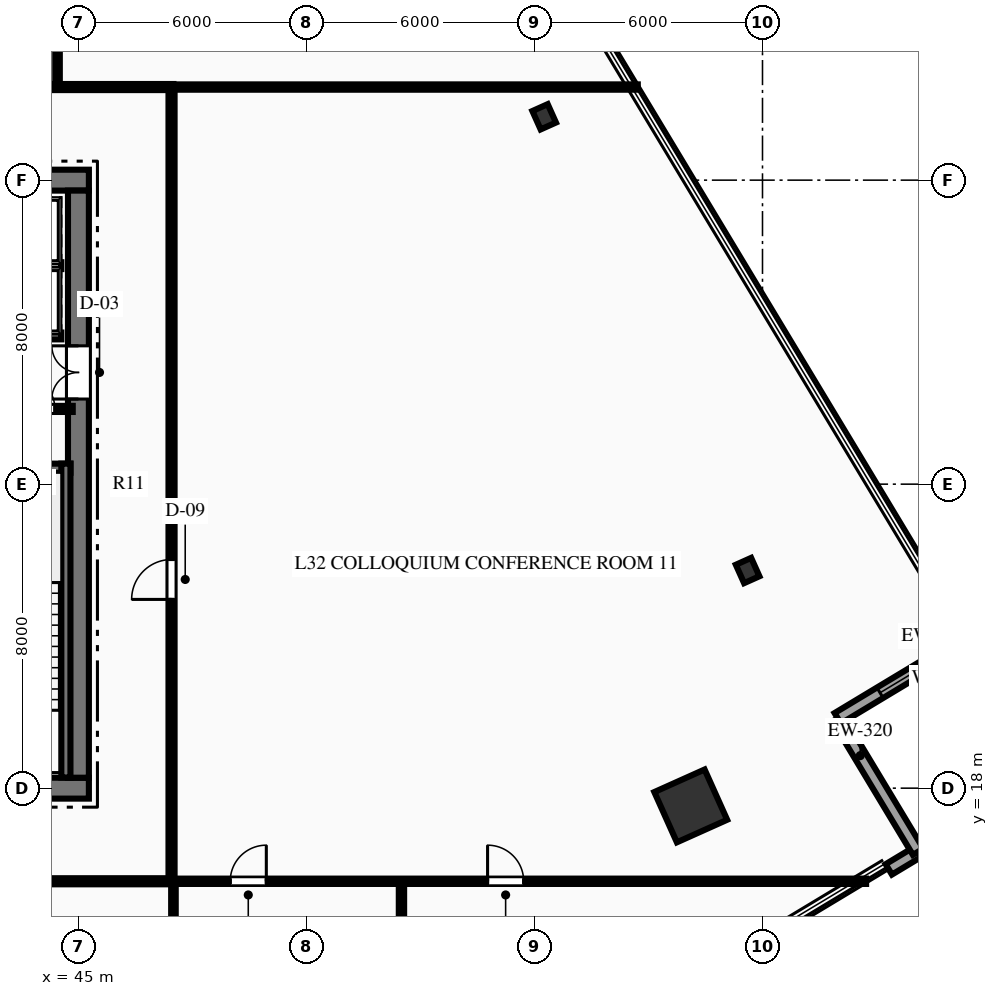
"""IFC4 building model, lengths in metres.
Left out: names, types, materials, properties, quantities, classifications, styles, units other than length and angle.
Written with IfcOpenShell. Run it as: python <this file> out.ifc"""

import sys

from ifc_helpers import new_model, si_unit, direction, frame, frame_2d, origin, origin_2d, place, context, subcontext, project, spatial, rectangle, hollow_rectangle, i_section, extrude, element, fill, save


model = new_model("IFC4")
c1 = context("Model", 3, precision=1e-05, world=origin(), true_north=direction((0.0, 1.0)))
c2 = subcontext(c1, "Body", "Model", "MODEL_VIEW")
j1 = project(units=[si_unit("LENGTHUNIT", "METRE"), si_unit("PLANEANGLEUNIT", "RADIAN")], contexts=[c1])
p1 = place(None, origin())
s1 = spatial("IfcSite", under=j1, at=p1, CompositionType="ELEMENT")
p2 = place(p1, origin())
s2 = spatial("IfcBuilding", under=s1, at=p2, CompositionType="ELEMENT")
p3 = place(p2, frame((0.0, 0.0, 131.7)))
s3 = spatial("IfcBuildingStorey", under=s2, at=p3, CompositionType="ELEMENT", Elevation=131.7)
p4 = place(p3, frame((26.725, 18.0, 0.0), z_axis=(0.0, 0.0, 1.0), x_axis=(1.0, 0.0, 0.0)))
e1 = element("IfcWall", 1, at=p4, inside=s3, PredefinedType="SHEAR", context=c2, shape_type="SweptSolid", body=[
    extrude(rectangle(XDim=18.55, YDim=0.55, at=frame_2d((9.275, 0.0))), origin(), (0.0, 0.0, 1.0), 4.5),
])
p5 = place(p4, frame((7.375, 0.0, 0.0)))
e2 = element("IfcOpeningElement", 2, at=p5, cuts=e1, PredefinedType="OPENING", context=c2, shape_type="SweptSolid", body=[
    extrude(rectangle(XDim=1.1, YDim=2.15, at=frame_2d((0.55, 1.075))), frame((0.0, 0.285, 0.0), z_axis=(0.0, -1.0, 0.0), x_axis=(1.0, 0.0, 0.0)), (0.0, 0.0, 1.0), 0.57),
])
p6 = place(p4, frame((10.075, 0.0, 0.0)))
e3 = element("IfcOpeningElement", 3, at=p6, cuts=e1, PredefinedType="OPENING", context=c2, shape_type="SweptSolid", body=[
    extrude(rectangle(XDim=1.1, YDim=2.15, at=frame_2d((0.55, 1.075))), frame((0.0, 0.285, 0.0), z_axis=(0.0, -1.0, 0.0), x_axis=(1.0, 0.0, 0.0)), (0.0, 0.0, 1.0), 0.57),
])
p7 = place(p3, frame((26.725, 34.0, 0.0), z_axis=(0.0, 0.0, 1.0), x_axis=(1.0, 0.0, 0.0)))
e4 = element("IfcWall", 4, at=p7, inside=s3, PredefinedType="SHEAR", context=c2, shape_type="SweptSolid", body=[
    extrude(rectangle(XDim=18.55, YDim=0.55, at=frame_2d((9.275, 0.0))), origin(), (0.0, 0.0, 1.0), 4.5),
])
p8 = place(p7, frame((1.24, 0.0, 0.0)))
e5 = element("IfcOpeningElement", 5, at=p8, cuts=e4, PredefinedType="OPENING", context=c2, shape_type="SweptSolid", body=[
    extrude(rectangle(XDim=1.1, YDim=2.15, at=frame_2d((0.55, 1.075))), frame((0.0, 0.285, 0.0), z_axis=(0.0, -1.0, 0.0), x_axis=(1.0, 0.0, 0.0)), (0.0, 0.0, 1.0), 0.57),
])
p9 = place(p7, frame((3.49, 0.0, 0.0)))
e6 = element("IfcOpeningElement", 6, at=p9, cuts=e4, PredefinedType="OPENING", context=c2, shape_type="SweptSolid", body=[
    extrude(rectangle(XDim=1.1, YDim=2.15, at=frame_2d((0.55, 1.075))), frame((0.0, 0.285, 0.0), z_axis=(0.0, -1.0, 0.0), x_axis=(1.0, 0.0, 0.0)), (0.0, 0.0, 1.0), 0.57),
])
p10 = place(p7, frame((13.96, 0.0, 0.0)))
e7 = element("IfcOpeningElement", 7, at=p10, cuts=e4, PredefinedType="OPENING", context=c2, shape_type="SweptSolid", body=[
    extrude(rectangle(XDim=1.1, YDim=2.15, at=frame_2d((0.55, 1.075))), frame((0.0, 0.285, 0.0), z_axis=(0.0, -1.0, 0.0), x_axis=(1.0, 0.0, 0.0)), (0.0, 0.0, 1.0), 0.57),
])
p11 = place(p7, frame((16.21, 0.0, 0.0)))
e8 = element("IfcOpeningElement", 8, at=p11, cuts=e4, PredefinedType="OPENING", context=c2, shape_type="SweptSolid", body=[
    extrude(rectangle(XDim=1.1, YDim=2.15, at=frame_2d((0.55, 1.075))), frame((0.0, 0.285, 0.0), z_axis=(0.0, -1.0, 0.0), x_axis=(1.0, 0.0, 0.0)), (0.0, 0.0, 1.0), 0.57),
])
p12 = place(p3, frame((45.0, 18.275, 0.0), z_axis=(0.0, 0.0, 1.0), x_axis=(0.0, 1.0, 0.0)))
e9 = element("IfcWall", 9, at=p12, inside=s3, PredefinedType="SHEAR", context=c2, shape_type="SweptSolid", body=[
    extrude(rectangle(XDim=15.45, YDim=0.55, at=frame_2d((7.725, 0.0))), origin(), (0.0, 0.0, 1.0), 4.5),
])
p13 = place(p12, frame((9.965, 0.0, 0.0)))
e10 = element("IfcOpeningElement", 10, at=p13, cuts=e9, PredefinedType="OPENING", context=c2, shape_type="SweptSolid", body=[
    extrude(rectangle(XDim=1.4, YDim=2.2, at=frame_2d((0.7, 1.1))), frame((0.0, 0.285, 0.0), z_axis=(0.0, -1.0, 0.0), x_axis=(1.0, 0.0, 0.0)), (0.0, 0.0, 1.0), 0.57),
])
p14 = place(p3, frame((40.81, 26.42, 0.0), z_axis=(0.0, 0.0, 1.0), x_axis=(1.0, 0.0, 0.0)))
e11 = element("IfcWall", 11, at=p14, inside=s3, PredefinedType="SHEAR", context=c2, shape_type="SweptSolid", body=[
    extrude(rectangle(XDim=3.98, YDim=0.24, at=frame_2d((1.99, 0.0))), origin(), (0.0, 0.0, 1.0), 4.5),
])
p15 = place(p3, frame((44.67, 18.28, 0.0), z_axis=(0.0, 0.0, 1.0), x_axis=(0.0, 1.0, 0.0)))
e12 = element("IfcWall", 12, at=p15, inside=s3, PredefinedType="SHEAR", context=c2, shape_type="SweptSolid", body=[
    extrude(rectangle(XDim=8.26, YDim=0.24, at=frame_2d((4.13, 0.0))), origin(), (0.0, 0.0, 1.0), 4.5),
])
p16 = place(p3, frame((61.112, 17.533, 0.0), z_axis=(0.0, 0.0, 1.0), x_axis=(0.912477494148, 0.409126902895, 0.0)))
e13 = element("IfcColumn", 13, at=p16, inside=s3, PredefinedType="COLUMN", context=c2, shape_type="SweptSolid", body=[
    extrude(hollow_rectangle(XDim=1.45, YDim=1.45, WallThickness=0.07, at=origin_2d()), origin(), (0.0, 0.0, 1.0), 4.5),
])
for number, where, z_axis, x_axis in (
    (14, (62.609, 23.727, 0.0), (0.0, 0.0, 1.0), (0.912, 0.409, 0.0)),
    (15, (57.255, 35.667, 0.0), (0.0, 0.0, 1.0), (0.912, 0.409, 0.0)),
):
    element("IfcColumn", number, at=place(p3, frame(where, z_axis=z_axis, x_axis=x_axis)), inside=s3, PredefinedType="COLUMN", context=c2, shape_type="SweptSolid", body=[
        extrude(i_section(OverallWidth=0.442, OverallDepth=0.531, WebThickness=0.066, FlangeThickness=0.106, at=origin_2d()), origin(), (0.0, 0.0, 1.0), 4.5),
    ])
p17 = place(p3, frame((67.094, 16.327, 0.0), z_axis=(0.0, 0.0, 1.0), x_axis=(-0.856630082839, -0.51593110119, 0.0)))
e16 = element("IfcWall", 16, at=p17, inside=s3, PredefinedType="STANDARD", context=c2, shape_type="SweptSolid", body=[
    extrude(rectangle(XDim=0.9, YDim=0.32, at=frame_2d((0.45, 0.0))), origin(), (0.0, 0.0, 1.0), 4.1),
])
p18 = place(p3, frame((64.98, 19.84, 0.0), z_axis=(0.0, 0.0, 1.0), x_axis=(0.515799949359, -0.856709059274, 0.0)))
e17 = element("IfcWall", 17, at=p18, inside=s3, PredefinedType="STANDARD", context=c2, shape_type="SweptSolid", body=[
    extrude(rectangle(XDim=4.1, YDim=0.32, at=frame_2d((2.05, 0.0))), origin(), (0.0, 0.0, 1.0), 4.1),
])
p19 = place(p3, frame((68.492, 21.954, 0.0), z_axis=(0.0, 0.0, 1.0), x_axis=(-0.856709059274, -0.515799949359, 0.0)))
e18 = element("IfcWall", 18, at=p19, inside=s3, PredefinedType="STANDARD", context=c2, shape_type="SweptSolid", body=[
    extrude(rectangle(XDim=4.1, YDim=0.32, at=frame_2d((2.05, 0.0))), origin(), (0.0, 0.0, 1.0), 4.1),
])
p20 = place(p19, frame((1.3, 0.0, 0.85)))
e19 = element("IfcOpeningElement", 19, at=p20, cuts=e18, PredefinedType="OPENING", context=c2, shape_type="SweptSolid", body=[
    extrude(rectangle(XDim=1.5, YDim=2.1, at=frame_2d((0.75, 1.05))), frame((0.0, 0.17, 0.0), z_axis=(0.0, -1.0, 0.0), x_axis=(1.0, 0.0, 0.0)), (0.0, 0.0, 1.0), 0.34),
])
p21 = place(p3, frame((40.8, 27.98, 0.0), z_axis=(0.0, 0.0, 1.0), x_axis=(1.0, 0.0, 0.0)))
e20 = element("IfcWall", 20, at=p21, inside=s3, PredefinedType="PARTITIONING", context=c2, shape_type="SweptSolid", body=[
    extrude(rectangle(XDim=4.05, YDim=0.16, at=frame_2d((2.025, 0.0))), origin(), (0.0, 0.0, 1.0), 4.1),
])
p22 = place(p21, frame((0.77, 0.0, 0.0)))
e21 = element("IfcOpeningElement", 21, at=p22, cuts=e20, PredefinedType="OPENING", context=c2, shape_type="SweptSolid", body=[
    extrude(rectangle(XDim=0.9, YDim=2.15, at=frame_2d((0.45, 1.075))), frame((0.0, 0.09, 0.0), z_axis=(0.0, -1.0, 0.0), x_axis=(1.0, 0.0, 0.0)), (0.0, 0.0, 1.0), 0.18),
])
p23 = place(p21, frame((2.68, 0.0, 0.0)))
e22 = element("IfcOpeningElement", 22, at=p23, cuts=e20, PredefinedType="OPENING", context=c2, shape_type="SweptSolid", body=[
    extrude(rectangle(XDim=0.9, YDim=2.15, at=frame_2d((0.45, 1.075))), frame((0.0, 0.09, 0.0), z_axis=(0.0, -1.0, 0.0), x_axis=(1.0, 0.0, 0.0)), (0.0, 0.0, 1.0), 0.18),
])
p24 = place(p3, frame((40.12, 29.9, 0.0), z_axis=(0.0, 0.0, 1.0), x_axis=(1.0, 0.0, 0.0)))
e23 = element("IfcWall", 23, at=p24, inside=s3, PredefinedType="PARTITIONING", context=c2, shape_type="SweptSolid", body=[
    extrude(rectangle(XDim=4.43, YDim=0.18, at=frame_2d((2.215, 0.0))), origin(), (0.0, 0.0, 1.0), 4.1),
])
p25 = place(p24, frame((0.565, 0.0, 0.0)))
e24 = element("IfcOpeningElement", 24, at=p25, cuts=e23, PredefinedType="OPENING", context=c2, shape_type="SweptSolid", body=[
    extrude(rectangle(XDim=1.1, YDim=2.15, at=frame_2d((0.55, 1.075))), frame((0.0, 0.1, 0.0), z_axis=(0.0, -1.0, 0.0), x_axis=(1.0, 0.0, 0.0)), (0.0, 0.0, 1.0), 0.2),
])
p26 = place(p24, frame((2.815, 0.0, 0.0)))
e25 = element("IfcOpeningElement", 25, at=p26, cuts=e23, PredefinedType="OPENING", context=c2, shape_type="SweptSolid", body=[
    extrude(rectangle(XDim=1.1, YDim=2.15, at=frame_2d((0.55, 1.075))), frame((0.0, 0.1, 0.0), z_axis=(0.0, -1.0, 0.0), x_axis=(1.0, 0.0, 0.0)), (0.0, 0.0, 1.0), 0.2),
])
p27 = place(p3, frame((40.12, 31.75, 0.0), z_axis=(0.0, 0.0, 1.0), x_axis=(1.0, 0.0, 0.0)))
e26 = element("IfcWall", 26, at=p27, inside=s3, PredefinedType="PARTITIONING", context=c2, shape_type="SweptSolid", body=[
    extrude(rectangle(XDim=4.43, YDim=0.18, at=frame_2d((2.215, 0.0))), origin(), (0.0, 0.0, 1.0), 4.1),
])
p28 = place(p3, frame((24.5, 15.55, 0.0), z_axis=(0.0, 0.0, 1.0), x_axis=(1.0, 0.0, 0.0)))
e27 = element("IfcWall", 27, at=p28, inside=s3, PredefinedType="PARTITIONING", context=c2, shape_type="SweptSolid", body=[
    extrude(rectangle(XDim=23.0, YDim=0.16, at=frame_2d((11.5, 0.0))), origin(), (0.0, 0.0, 1.0), 4.1),
])
p29 = place(p28, frame((7.725, 0.0, 0.0)))
e28 = element("IfcOpeningElement", 28, at=p29, cuts=e27, PredefinedType="OPENING", context=c2, shape_type="SweptSolid", body=[
    extrude(rectangle(XDim=1.05, YDim=2.15, at=frame_2d((0.525, 1.075))), frame((0.0, 0.09, 0.0), z_axis=(0.0, -1.0, 0.0), x_axis=(1.0, 0.0, 0.0)), (0.0, 0.0, 1.0), 0.18),
])
p30 = place(p28, frame((17.489, 0.0, 0.0)))
e29 = element("IfcOpeningElement", 29, at=p30, cuts=e27, PredefinedType="OPENING", context=c2, shape_type="SweptSolid", body=[
    extrude(rectangle(XDim=1.05, YDim=2.15, at=frame_2d((0.525, 1.075))), frame((0.0, 0.09, 0.0), z_axis=(0.0, -1.0, 0.0), x_axis=(1.0, 0.0, 0.0)), (0.0, 0.0, 1.0), 0.18),
])
p31 = place(p3, frame((24.5, 36.45, 0.0), z_axis=(0.0, 0.0, 1.0), x_axis=(1.0, 0.0, 0.0)))
e30 = element("IfcWall", 30, at=p31, inside=s3, PredefinedType="PARTITIONING", context=c2, shape_type="SweptSolid", body=[
    extrude(rectangle(XDim=23.0, YDim=0.16, at=frame_2d((11.5, 0.0))), origin(), (0.0, 0.0, 1.0), 4.1),
])
p32 = place(p31, frame((13.75, 0.0, 0.0)))
e31 = element("IfcOpeningElement", 31, at=p32, cuts=e30, PredefinedType="OPENING", context=c2, shape_type="SweptSolid", body=[
    extrude(rectangle(XDim=0.9, YDim=2.15, at=frame_2d((0.45, 1.075))), frame((0.0, 0.09, 0.0), z_axis=(0.0, -1.0, 0.0), x_axis=(1.0, 0.0, 0.0)), (0.0, 0.0, 1.0), 0.18),
])
p33 = place(p31, frame((16.05, 0.0, 0.0)))
e32 = element("IfcOpeningElement", 32, at=p33, cuts=e30, PredefinedType="OPENING", context=c2, shape_type="SweptSolid", body=[
    extrude(rectangle(XDim=0.9, YDim=2.15, at=frame_2d((0.45, 1.075))), frame((0.0, 0.09, 0.0), z_axis=(0.0, -1.0, 0.0), x_axis=(1.0, 0.0, 0.0)), (0.0, 0.0, 1.0), 0.18),
])
p34 = place(p31, frame((18.3, 0.0, 0.0)))
e33 = element("IfcOpeningElement", 33, at=p34, cuts=e30, PredefinedType="OPENING", context=c2, shape_type="SweptSolid", body=[
    extrude(rectangle(XDim=1.0, YDim=2.15, at=frame_2d((0.5, 1.075))), frame((0.0, 0.09, 0.0), z_axis=(0.0, -1.0, 0.0), x_axis=(1.0, 0.0, 0.0)), (0.0, 0.0, 1.0), 0.18),
])
p35 = place(p31, frame((3.101, 0.0, 0.0)))
e34 = element("IfcOpeningElement", 34, at=p35, cuts=e30, PredefinedType="OPENING", context=c2, shape_type="SweptSolid", body=[
    extrude(rectangle(XDim=1.05, YDim=2.15, at=frame_2d((0.525, 1.075))), frame((0.0, 0.09, 0.0), z_axis=(0.0, -1.0, 0.0), x_axis=(1.0, 0.0, 0.0)), (0.0, 0.0, 1.0), 0.18),
])
p36 = place(p31, frame((10.055, 0.0, 0.0)))
e35 = element("IfcOpeningElement", 35, at=p36, cuts=e30, PredefinedType="OPENING", context=c2, shape_type="SweptSolid", body=[
    extrude(rectangle(XDim=1.05, YDim=2.15, at=frame_2d((0.525, 1.075))), frame((0.0, 0.09, 0.0), z_axis=(0.0, -1.0, 0.0), x_axis=(1.0, 0.0, 0.0)), (0.0, 0.0, 1.0), 0.18),
])
p37 = place(p3, frame((47.45, 15.55, 0.0), z_axis=(0.0, 0.0, 1.0), x_axis=(0.0, 1.0, 0.0)))
e36 = element("IfcWall", 36, at=p37, inside=s3, PredefinedType="PARTITIONING", context=c2, shape_type="SweptSolid", body=[
    extrude(rectangle(XDim=20.9, YDim=0.16, at=frame_2d((10.45, 0.0))), origin(), (0.0, 0.0, 1.0), 4.1),
])
p38 = place(p37, frame((7.417, 0.0, 0.0)))
e37 = element("IfcOpeningElement", 37, at=p38, cuts=e36, PredefinedType="OPENING", context=c2, shape_type="SweptSolid", body=[
    extrude(rectangle(XDim=1.05, YDim=2.15, at=frame_2d((0.525, 1.075))), frame((0.0, 0.09, 0.0), z_axis=(0.0, -1.0, 0.0), x_axis=(1.0, 0.0, 0.0)), (0.0, 0.0, 1.0), 0.18),
])
p39 = place(p3, frame((44.45, 36.45, 0.0), z_axis=(0.0, 0.0, 1.0), x_axis=(0.0, 1.0, 0.0)))
e38 = element("IfcWall", 38, at=p39, inside=s3, PredefinedType="PARTITIONING", context=c2, shape_type="SweptSolid", body=[
    extrude(rectangle(XDim=3.9, YDim=0.12, at=frame_2d((1.95, 0.0))), origin(), (0.0, 0.0, 1.0), 2.595),
])
p40 = place(p3, frame((47.45, 15.55, 0.0), z_axis=(0.0, 0.0, 1.0), x_axis=(1.0, 0.0, 0.0)))
e39 = element("IfcWall", 39, at=p40, inside=s3, PredefinedType="PARTITIONING", context=c2, shape_type="SweptSolid", body=[
    extrude(rectangle(XDim=18.276, YDim=0.14, at=frame_2d((9.138, 0.0))), origin(), (0.0, 0.0, 1.0), 4.1),
])
p41 = place(p40, frame((1.544, 0.0, 0.0)))
e40 = element("IfcOpeningElement", 40, at=p41, cuts=e39, PredefinedType="OPENING", context=c2, shape_type="SweptSolid", body=[
    extrude(rectangle(XDim=0.95, YDim=2.15, at=frame_2d((0.475, 1.075))), frame((0.0, 0.08, 0.0), z_axis=(0.0, -1.0, 0.0), x_axis=(1.0, 0.0, 0.0)), (0.0, 0.0, 1.0), 0.16),
])
p42 = place(p40, frame((8.316, 0.0, 0.0)))
e41 = element("IfcOpeningElement", 41, at=p42, cuts=e39, PredefinedType="OPENING", context=c2, shape_type="SweptSolid", body=[
    extrude(rectangle(XDim=0.95, YDim=2.15, at=frame_2d((0.475, 1.075))), frame((0.0, 0.08, 0.0), z_axis=(0.0, -1.0, 0.0), x_axis=(1.0, 0.0, 0.0)), (0.0, 0.0, 1.0), 0.16),
])
p43 = place(p3, frame((47.45, 36.45, 0.0), z_axis=(0.0, 0.0, 1.0), x_axis=(1.0, 0.0, 0.0)))
e42 = element("IfcWall", 42, at=p43, inside=s3, PredefinedType="PARTITIONING", context=c2, shape_type="SweptSolid", body=[
    extrude(rectangle(XDim=12.269, YDim=0.14, at=frame_2d((6.134, 0.0))), origin(), (0.0, 0.0, 1.0), 4.1),
])
p44 = place(p3, frame((47.5, 4.577, 0.0), z_axis=(0.0, 0.0, 1.0), x_axis=(0.0, 1.0, 0.0)))
e43 = element("IfcWall", 43, at=p44, inside=s3, PredefinedType="PARTITIONING", context=c2, shape_type="SweptSolid", body=[
    extrude(rectangle(XDim=10.973, YDim=0.12, at=frame_2d((5.487, 0.0))), origin(), (0.0, 0.0, 1.0), 4.1),
])
p45 = place(p3, frame((53.5, 8.189, 0.0), z_axis=(0.0, 0.0, 1.0), x_axis=(0.0, 1.0, 0.0)))
e44 = element("IfcWall", 44, at=p45, inside=s3, PredefinedType="PARTITIONING", context=c2, shape_type="SweptSolid", body=[
    extrude(rectangle(XDim=7.361, YDim=0.14, at=frame_2d((3.68, 0.0))), origin(), (0.0, 0.0, 1.0), 4.1),
])
p46 = place(p20, origin())
e45 = element("IfcWindow", 45, at=p46, inside=s3, PartitioningType="SINGLE_PANEL", PredefinedType="WINDOW", context=c2, shape_type="SweptSolid", body=[
    extrude(rectangle(XDim=1.5, YDim=2.1, at=frame_2d((0.75, 1.05))), frame((0.0, 0.03, 0.0), z_axis=(0.0, -1.0, 0.0), x_axis=(1.0, 0.0, 0.0)), (0.0, 0.0, 1.0), 0.06),
])
fill(e19, e45)
p47 = place(p23, origin())
e46 = element("IfcDoor", 46, at=p47, inside=s3, OperationType="SINGLE_SWING_LEFT", PredefinedType="DOOR", context=c2, shape_type="SweptSolid", body=[
    extrude(rectangle(XDim=0.9, YDim=2.15, at=frame_2d((0.45, 1.075))), frame((0.0, 0.025, 0.0), z_axis=(0.0, -1.0, 0.0), x_axis=(1.0, 0.0, 0.0)), (0.0, 0.0, 1.0), 0.05),
])
fill(e22, e46)
p48 = place(p13, origin())
e47 = element("IfcDoor", 47, at=p48, inside=s3, OperationType="DOUBLE_DOOR_SINGLE_SWING", PredefinedType="DOOR", context=c2, shape_type="SweptSolid", body=[
    extrude(rectangle(XDim=1.4, YDim=2.2, at=frame_2d((0.7, 1.1))), frame((0.0, 0.025, 0.0), z_axis=(0.0, -1.0, 0.0), x_axis=(1.0, 0.0, 0.0)), (0.0, 0.0, 1.0), 0.05),
])
fill(e10, e47)
p49 = place(p41, origin())
e48 = element("IfcDoor", 48, at=p49, inside=s3, OperationType="SINGLE_SWING_RIGHT", PredefinedType="DOOR", context=c2, shape_type="SweptSolid", body=[
    extrude(rectangle(XDim=0.95, YDim=2.15, at=frame_2d((0.475, 1.075))), frame((0.0, 0.025, 0.0), z_axis=(0.0, -1.0, 0.0), x_axis=(1.0, 0.0, 0.0)), (0.0, 0.0, 1.0), 0.05),
])
fill(e40, e48)
p50 = place(p42, origin())
e49 = element("IfcDoor", 49, at=p50, inside=s3, OperationType="SINGLE_SWING_LEFT", PredefinedType="DOOR", context=c2, shape_type="SweptSolid", body=[
    extrude(rectangle(XDim=0.95, YDim=2.15, at=frame_2d((0.475, 1.075))), frame((0.0, 0.025, 0.0), z_axis=(0.0, -1.0, 0.0), x_axis=(1.0, 0.0, 0.0)), (0.0, 0.0, 1.0), 0.05),
])
fill(e41, e49)
p51 = place(p38, origin())
e50 = element("IfcDoor", 50, at=p51, inside=s3, OperationType="SINGLE_SWING_LEFT", PredefinedType="DOOR", context=c2, shape_type="SweptSolid", body=[
    extrude(rectangle(XDim=1.05, YDim=2.15, at=frame_2d((0.525, 1.075))), frame((0.0, 0.025, 0.0), z_axis=(0.0, -1.0, 0.0), x_axis=(1.0, 0.0, 0.0)), (0.0, 0.0, 1.0), 0.05),
])
fill(e37, e50)
save(model, sys.argv[1])
